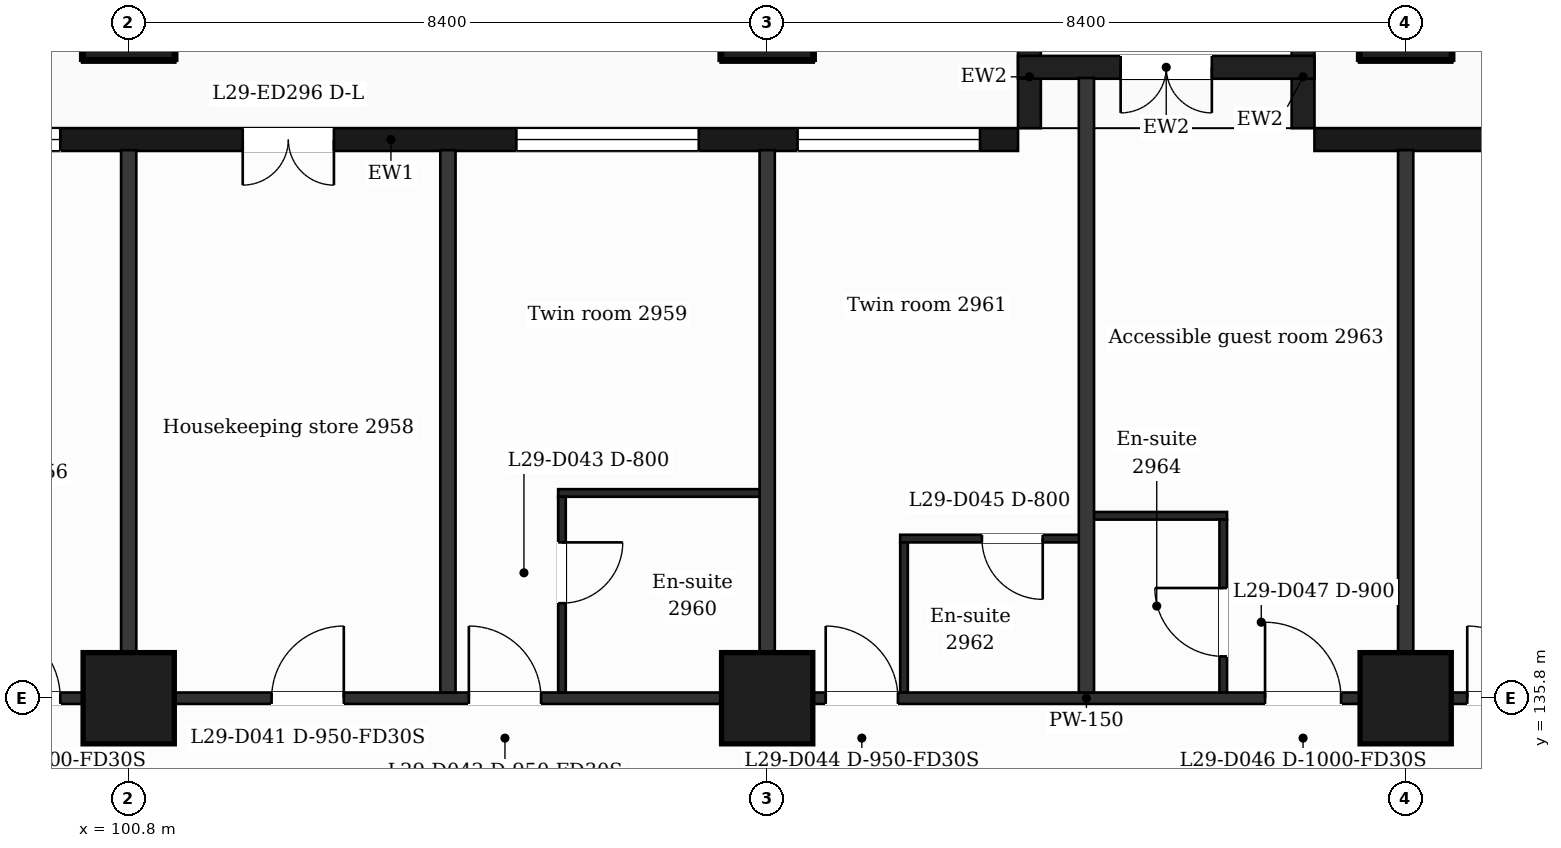
"""IFC4 building model, lengths in metres.
Left out: names, types, materials, properties, quantities, classifications, styles, units other than length and angle.
Written with IfcOpenShell. Run it as: python <this file> out.ifc"""

import sys

from ifc_helpers import new_model, si_unit, direction, frame, frame_2d, origin, origin_2d, place, context, subcontext, project, spatial, rectangle, extrude, element, fill, save


model = new_model("IFC4")
c1 = context("Model", 3, precision=1e-05, world=origin(), true_north=direction((0.0, 1.0)))
c2 = subcontext(c1, "Body", "Model", "MODEL_VIEW")
j1 = project(units=[si_unit("LENGTHUNIT", "METRE"), si_unit("PLANEANGLEUNIT", "RADIAN")], contexts=[c1])
p1 = place(None, origin())
s1 = spatial("IfcSite", under=j1, at=p1, CompositionType="ELEMENT")
p2 = place(p1, origin())
s2 = spatial("IfcBuilding", under=s1, at=p2, CompositionType="ELEMENT")
p3 = place(p2, frame((0.0, 0.0, 124.3)))
s3 = spatial("IfcBuildingStorey", under=s2, at=p3, CompositionType="ELEMENT", Elevation=124.3)
for number, where, z_axis, x_axis in (
    (1, (100.8, 135.8, 0.0), (0.0, 0.0, 1.0), (1.0, 0.0, 0.0)),
    (2, (109.2, 135.8, 0.0), (0.0, 0.0, 1.0), (1.0, 0.0, 0.0)),
    (3, (117.6, 135.8, 0.0), (0.0, 0.0, 1.0), (1.0, 0.0, 0.0)),
    (4, (100.8, 144.8, 0.0), (0.0, 0.0, 1.0), (1.0, 0.0, 0.0)),
    (5, (109.2, 144.8, 0.0), (0.0, 0.0, 1.0), (1.0, 0.0, 0.0)),
    (6, (117.6, 144.8, 0.0), (0.0, 0.0, 1.0), (1.0, 0.0, 0.0)),
):
    element("IfcColumn", number, at=place(p3, frame(where, z_axis=z_axis, x_axis=x_axis)), inside=s3, PredefinedType="COLUMN", context=c2, shape_type="SweptSolid", body=[
        extrude(rectangle(XDim=1.2, YDim=1.2, at=origin_2d()), origin(), (0.0, 0.0, 1.0), 3.7),
    ])
p4 = place(p3, frame((130.65, 143.15, 0.0), z_axis=(0.0, 0.0, 1.0), x_axis=(-1.0, 0.0, 0.0)))
e7 = element("IfcWall", 7, at=p4, inside=s3, PredefinedType="SOLIDWALL", context=c2, shape_type="SweptSolid", body=[
    extrude(rectangle(XDim=14.25, YDim=0.3, at=frame_2d((7.125, 0.0))), origin(), (0.0, 0.0, 1.0), 3.38),
])
p5 = place(p4, frame((1.35, 0.0, 0.9)))
e8 = element("IfcOpeningElement", 8, at=p5, cuts=e7, PredefinedType="OPENING", context=c2, shape_type="SweptSolid", body=[
    extrude(rectangle(XDim=2.4, YDim=2.1, at=frame_2d((1.2, 1.05))), frame((0.0, 0.16, 0.0), z_axis=(0.0, -1.0, 0.0), x_axis=(1.0, 0.0, 0.0)), (0.0, 0.0, 1.0), 0.32),
])
p6 = place(p4, frame((6.15, 0.0, 0.0)))
e9 = element("IfcOpeningElement", 9, at=p6, cuts=e7, PredefinedType="OPENING", context=c2, shape_type="SweptSolid", body=[
    extrude(rectangle(XDim=1.2, YDim=2.4, at=frame_2d((0.6, 1.2))), frame((0.0, 0.16, 0.0), z_axis=(0.0, -1.0, 0.0), x_axis=(1.0, 0.0, 0.0)), (0.0, 0.0, 1.0), 0.32),
])
p7 = place(p4, frame((10.35, 0.0, 0.9)))
e10 = element("IfcOpeningElement", 10, at=p7, cuts=e7, PredefinedType="OPENING", context=c2, shape_type="SweptSolid", body=[
    extrude(rectangle(XDim=1.2, YDim=2.1, at=frame_2d((0.6, 1.05))), frame((0.0, 0.16, 0.0), z_axis=(0.0, -1.0, 0.0), x_axis=(1.0, 0.0, 0.0)), (0.0, 0.0, 1.0), 0.32),
])
p8 = place(p3, frame((112.5, 143.15, 0.0), z_axis=(0.0, 0.0, 1.0), x_axis=(-1.0, 0.0, 0.0)))
e11 = element("IfcWall", 11, at=p8, inside=s3, PredefinedType="SOLIDWALL", context=c2, shape_type="SweptSolid", body=[
    extrude(rectangle(XDim=16.5, YDim=0.3, at=frame_2d((8.25, 0.0))), origin(), (0.0, 0.0, 1.0), 3.38),
])
p9 = place(p8, frame((0.5, 0.0, 0.9)))
e12 = element("IfcOpeningElement", 12, at=p9, cuts=e11, PredefinedType="OPENING", context=c2, shape_type="SweptSolid", body=[
    extrude(rectangle(XDim=2.4, YDim=2.1, at=frame_2d((1.2, 1.05))), frame((0.0, 0.16, 0.0), z_axis=(0.0, -1.0, 0.0), x_axis=(1.0, 0.0, 0.0)), (0.0, 0.0, 1.0), 0.32),
])
p10 = place(p8, frame((4.2, 0.0, 0.9)))
e13 = element("IfcOpeningElement", 13, at=p10, cuts=e11, PredefinedType="OPENING", context=c2, shape_type="SweptSolid", body=[
    extrude(rectangle(XDim=2.4, YDim=2.1, at=frame_2d((1.2, 1.05))), frame((0.0, 0.16, 0.0), z_axis=(0.0, -1.0, 0.0), x_axis=(1.0, 0.0, 0.0)), (0.0, 0.0, 1.0), 0.32),
])
p11 = place(p8, frame((9.0, 0.0, 0.0)))
e14 = element("IfcOpeningElement", 14, at=p11, cuts=e11, PredefinedType="OPENING", context=c2, shape_type="SweptSolid", body=[
    extrude(rectangle(XDim=1.2, YDim=2.4, at=frame_2d((0.6, 1.2))), frame((0.0, 0.16, 0.0), z_axis=(0.0, -1.0, 0.0), x_axis=(1.0, 0.0, 0.0)), (0.0, 0.0, 1.0), 0.32),
])
p12 = place(p8, frame((12.6, 0.0, 0.9)))
e15 = element("IfcOpeningElement", 15, at=p12, cuts=e11, PredefinedType="OPENING", context=c2, shape_type="SweptSolid", body=[
    extrude(rectangle(XDim=2.4, YDim=2.1, at=frame_2d((1.2, 1.05))), frame((0.0, 0.16, 0.0), z_axis=(0.0, -1.0, 0.0), x_axis=(1.0, 0.0, 0.0)), (0.0, 0.0, 1.0), 0.32),
])
for number, where, z_axis, x_axis in (
    (16, (116.25, 143.3, 0.0), (0.0, 0.0, 1.0), (0.0, 1.0, 0.0)),
    (17, (112.65, 143.3, 0.0), (0.0, 0.0, 1.0), (0.0, 1.0, 0.0)),
):
    element("IfcWall", number, at=place(p3, frame(where, z_axis=z_axis, x_axis=x_axis)), inside=s3, PredefinedType="SOLIDWALL", context=c2, shape_type="SweptSolid", body=[
        extrude(rectangle(XDim=1.35, YDim=0.3, at=frame_2d((0.675, 0.0))), origin(), (0.0, 0.0, 1.0), 3.38),
    ])
p13 = place(p3, frame((116.4, 144.1, 0.0), z_axis=(0.0, 0.0, 1.0), x_axis=(-1.0, 0.0, 0.0)))
e18 = element("IfcWall", 18, at=p13, inside=s3, PredefinedType="SOLIDWALL", context=c2, shape_type="SweptSolid", body=[
    extrude(rectangle(XDim=3.9, YDim=0.3, at=frame_2d((1.95, 0.0))), origin(), (0.0, 0.0, 1.0), 3.38),
])
p14 = place(p13, frame((1.35, 0.0, 0.0)))
e19 = element("IfcOpeningElement", 19, at=p14, cuts=e18, PredefinedType="OPENING", context=c2, shape_type="SweptSolid", body=[
    extrude(rectangle(XDim=1.2, YDim=2.4, at=frame_2d((0.6, 1.2))), frame((0.0, 0.16, 0.0), z_axis=(0.0, -1.0, 0.0), x_axis=(1.0, 0.0, 0.0)), (0.0, 0.0, 1.0), 0.32),
])
p15 = place(p3, frame((90.895, 135.8, 0.0), z_axis=(0.0, 0.0, 1.0), x_axis=(1.0, 0.0, 0.0)))
e20 = element("IfcWall", 20, at=p15, inside=s3, PredefinedType="PARTITIONING", context=c2, shape_type="SweptSolid", body=[
    extrude(rectangle(XDim=45.011, YDim=0.15, at=frame_2d((22.505, 0.0))), origin(), (0.0, 0.0, 1.0), 3.38),
])
p16 = place(p15, frame((8.005, 0.0, 0.0)))
e21 = element("IfcOpeningElement", 21, at=p16, cuts=e20, PredefinedType="OPENING", context=c2, shape_type="SweptSolid", body=[
    extrude(rectangle(XDim=1.0, YDim=2.1, at=frame_2d((0.5, 1.05))), frame((0.0, 0.085, 0.0), z_axis=(0.0, -1.0, 0.0), x_axis=(1.0, 0.0, 0.0)), (0.0, 0.0, 1.0), 0.17),
])
p17 = place(p15, frame((11.785, 0.0, 0.0)))
e22 = element("IfcOpeningElement", 22, at=p17, cuts=e20, PredefinedType="OPENING", context=c2, shape_type="SweptSolid", body=[
    extrude(rectangle(XDim=0.95, YDim=2.1, at=frame_2d((0.475, 1.05))), frame((0.0, 0.085, 0.0), z_axis=(0.0, -1.0, 0.0), x_axis=(1.0, 0.0, 0.0)), (0.0, 0.0, 1.0), 0.17),
])
p18 = place(p15, frame((14.38, 0.0, 0.0)))
e23 = element("IfcOpeningElement", 23, at=p18, cuts=e20, PredefinedType="OPENING", context=c2, shape_type="SweptSolid", body=[
    extrude(rectangle(XDim=0.95, YDim=2.1, at=frame_2d((0.475, 1.05))), frame((0.0, 0.085, 0.0), z_axis=(0.0, -1.0, 0.0), x_axis=(1.0, 0.0, 0.0)), (0.0, 0.0, 1.0), 0.17),
])
p19 = place(p15, frame((19.075, 0.0, 0.0)))
e24 = element("IfcOpeningElement", 24, at=p19, cuts=e20, PredefinedType="OPENING", context=c2, shape_type="SweptSolid", body=[
    extrude(rectangle(XDim=0.95, YDim=2.1, at=frame_2d((0.475, 1.05))), frame((0.0, 0.085, 0.0), z_axis=(0.0, -1.0, 0.0), x_axis=(1.0, 0.0, 0.0)), (0.0, 0.0, 1.0), 0.17),
])
p20 = place(p15, frame((24.855, 0.0, 0.0)))
e25 = element("IfcOpeningElement", 25, at=p20, cuts=e20, PredefinedType="OPENING", context=c2, shape_type="SweptSolid", body=[
    extrude(rectangle(XDim=1.0, YDim=2.1, at=frame_2d((0.5, 1.05))), frame((0.0, 0.085, 0.0), z_axis=(0.0, -1.0, 0.0), x_axis=(1.0, 0.0, 0.0)), (0.0, 0.0, 1.0), 0.17),
])
p21 = place(p15, frame((27.515, 0.0, 0.0)))
e26 = element("IfcOpeningElement", 26, at=p21, cuts=e20, PredefinedType="OPENING", context=c2, shape_type="SweptSolid", body=[
    extrude(rectangle(XDim=0.95, YDim=2.1, at=frame_2d((0.475, 1.05))), frame((0.0, 0.085, 0.0), z_axis=(0.0, -1.0, 0.0), x_axis=(1.0, 0.0, 0.0)), (0.0, 0.0, 1.0), 0.17),
])
p22 = place(p15, frame((33.242, 0.0, 0.0)))
e27 = element("IfcOpeningElement", 27, at=p22, cuts=e20, PredefinedType="OPENING", context=c2, shape_type="SweptSolid", body=[
    extrude(rectangle(XDim=0.95, YDim=2.1, at=frame_2d((0.475, 1.05))), frame((0.0, 0.085, 0.0), z_axis=(0.0, -1.0, 0.0), x_axis=(1.0, 0.0, 0.0)), (0.0, 0.0, 1.0), 0.17),
])
p23 = place(p15, frame((37.105, 0.0, 0.0)))
e28 = element("IfcOpeningElement", 28, at=p23, cuts=e20, PredefinedType="OPENING", context=c2, shape_type="SweptSolid", body=[
    extrude(rectangle(XDim=1.0, YDim=2.1, at=frame_2d((0.5, 1.05))), frame((0.0, 0.085, 0.0), z_axis=(0.0, -1.0, 0.0), x_axis=(1.0, 0.0, 0.0)), (0.0, 0.0, 1.0), 0.17),
])
p24 = place(p3, frame((110.95, 137.9, 0.0), z_axis=(0.0, 0.0, 1.0), x_axis=(1.0, 0.0, 0.0)))
e29 = element("IfcWall", 29, at=p24, inside=s3, PredefinedType="PARTITIONING", context=c2, shape_type="SweptSolid", body=[
    extrude(rectangle(XDim=2.45, YDim=0.1, at=frame_2d((1.225, 0.0))), origin(), (0.0, 0.0, 1.0), 3.38),
])
p25 = place(p24, frame((1.075, 0.0, 0.0)))
e30 = element("IfcOpeningElement", 30, at=p25, cuts=e29, PredefinedType="OPENING", context=c2, shape_type="SweptSolid", body=[
    extrude(rectangle(XDim=0.8, YDim=2.1, at=frame_2d((0.4, 1.05))), frame((0.0, 0.06, 0.0), z_axis=(0.0, -1.0, 0.0), x_axis=(1.0, 0.0, 0.0)), (0.0, 0.0, 1.0), 0.12),
])
p26 = place(p3, frame((113.4, 138.2, 0.0), z_axis=(0.0, 0.0, 1.0), x_axis=(1.0, 0.0, 0.0)))
e31 = element("IfcWall", 31, at=p26, inside=s3, PredefinedType="PARTITIONING", context=c2, shape_type="SweptSolid", body=[
    extrude(rectangle(XDim=1.85, YDim=0.1, at=frame_2d((0.925, 0.0))), origin(), (0.0, 0.0, 1.0), 3.38),
])
p27 = place(p3, frame((106.45, 138.5, 0.0), z_axis=(0.0, 0.0, 1.0), x_axis=(1.0, 0.0, 0.0)))
e32 = element("IfcWall", 32, at=p27, inside=s3, PredefinedType="PARTITIONING", context=c2, shape_type="SweptSolid", body=[
    extrude(rectangle(XDim=2.75, YDim=0.1, at=frame_2d((1.375, 0.0))), origin(), (0.0, 0.0, 1.0), 3.38),
])
for number, where, z_axis, x_axis in (
    (33, (100.8, 135.875, 0.0), (0.0, 0.0, 1.0), (0.0, 1.0, 0.0)),
    (34, (105.0, 135.875, 0.0), (0.0, 0.0, 1.0), (0.0, 1.0, 0.0)),
):
    element("IfcWall", number, at=place(p3, frame(where, z_axis=z_axis, x_axis=x_axis)), inside=s3, PredefinedType="PARTITIONING", context=c2, shape_type="SweptSolid", body=[
        extrude(rectangle(XDim=7.135, YDim=0.2, at=frame_2d((3.567, 0.0))), origin(), (0.0, 0.0, 1.0), 3.38),
    ])
p28 = place(p3, frame((106.5, 135.875, 0.0), z_axis=(0.0, 0.0, 1.0), x_axis=(0.0, 1.0, 0.0)))
e35 = element("IfcWall", 35, at=p28, inside=s3, PredefinedType="PARTITIONING", context=c2, shape_type="SweptSolid", body=[
    extrude(rectangle(XDim=2.575, YDim=0.1, at=frame_2d((1.288, 0.0))), origin(), (0.0, 0.0, 1.0), 3.38),
])
p29 = place(p28, frame((1.175, 0.0, 0.0)))
e36 = element("IfcOpeningElement", 36, at=p29, cuts=e35, PredefinedType="OPENING", context=c2, shape_type="SweptSolid", body=[
    extrude(rectangle(XDim=0.8, YDim=2.1, at=frame_2d((0.4, 1.05))), frame((0.0, 0.06, 0.0), z_axis=(0.0, -1.0, 0.0), x_axis=(1.0, 0.0, 0.0)), (0.0, 0.0, 1.0), 0.12),
])
p30 = place(p3, frame((109.2, 135.875, 0.0), z_axis=(0.0, 0.0, 1.0), x_axis=(0.0, 1.0, 0.0)))
e37 = element("IfcWall", 37, at=p30, inside=s3, PredefinedType="PARTITIONING", context=c2, shape_type="SweptSolid", body=[
    extrude(rectangle(XDim=7.135, YDim=0.2, at=frame_2d((3.567, 0.0))), origin(), (0.0, 0.0, 1.0), 3.38),
])
p31 = place(p3, frame((111.0, 135.875, 0.0), z_axis=(0.0, 0.0, 1.0), x_axis=(0.0, 1.0, 0.0)))
e38 = element("IfcWall", 38, at=p31, inside=s3, PredefinedType="PARTITIONING", context=c2, shape_type="SweptSolid", body=[
    extrude(rectangle(XDim=1.975, YDim=0.1, at=frame_2d((0.988, 0.0))), origin(), (0.0, 0.0, 1.0), 3.38),
])
p32 = place(p3, frame((113.4, 135.875, 0.0), z_axis=(0.0, 0.0, 1.0), x_axis=(0.0, 1.0, 0.0)))
e39 = element("IfcWall", 39, at=p32, inside=s3, PredefinedType="PARTITIONING", context=c2, shape_type="SweptSolid", body=[
    extrude(rectangle(XDim=8.085, YDim=0.2, at=frame_2d((4.042, 0.0))), origin(), (0.0, 0.0, 1.0), 3.38),
])
p33 = place(p3, frame((115.2, 135.875, 0.0), z_axis=(0.0, 0.0, 1.0), x_axis=(0.0, 1.0, 0.0)))
e40 = element("IfcWall", 40, at=p33, inside=s3, PredefinedType="PARTITIONING", context=c2, shape_type="SweptSolid", body=[
    extrude(rectangle(XDim=2.275, YDim=0.1, at=frame_2d((1.137, 0.0))), origin(), (0.0, 0.0, 1.0), 3.38),
])
p34 = place(p33, frame((0.475, 0.0, 0.0)))
e41 = element("IfcOpeningElement", 41, at=p34, cuts=e40, PredefinedType="OPENING", context=c2, shape_type="SweptSolid", body=[
    extrude(rectangle(XDim=0.9, YDim=2.1, at=frame_2d((0.45, 1.05))), frame((0.0, 0.06, 0.0), z_axis=(0.0, -1.0, 0.0), x_axis=(1.0, 0.0, 0.0)), (0.0, 0.0, 1.0), 0.12),
])
p35 = place(p3, frame((117.6, 135.875, 0.0), z_axis=(0.0, 0.0, 1.0), x_axis=(0.0, 1.0, 0.0)))
e42 = element("IfcWall", 42, at=p35, inside=s3, PredefinedType="PARTITIONING", context=c2, shape_type="SweptSolid", body=[
    extrude(rectangle(XDim=7.135, YDim=0.2, at=frame_2d((3.567, 0.0))), origin(), (0.0, 0.0, 1.0), 3.38),
])
p36 = place(p9, origin())
e43 = element("IfcWindow", 43, at=p36, inside=s3, PartitioningType="SINGLE_PANEL", PredefinedType="WINDOW", context=c2, shape_type="SweptSolid", body=[
    extrude(rectangle(XDim=2.4, YDim=2.1, at=frame_2d((1.2, 1.05))), frame((0.0, 0.03, 0.0), z_axis=(0.0, -1.0, 0.0), x_axis=(1.0, 0.0, 0.0)), (0.0, 0.0, 1.0), 0.06),
])
fill(e12, e43)
p37 = place(p10, origin())
e44 = element("IfcWindow", 44, at=p37, inside=s3, PartitioningType="SINGLE_PANEL", PredefinedType="WINDOW", context=c2, shape_type="SweptSolid", body=[
    extrude(rectangle(XDim=2.4, YDim=2.1, at=frame_2d((1.2, 1.05))), frame((0.0, 0.03, 0.0), z_axis=(0.0, -1.0, 0.0), x_axis=(1.0, 0.0, 0.0)), (0.0, 0.0, 1.0), 0.06),
])
fill(e13, e44)
p38 = place(p11, origin())
e45 = element("IfcDoor", 45, at=p38, inside=s3, OperationType="DOUBLE_DOOR_SINGLE_SWING", PredefinedType="DOOR", context=c2, shape_type="SweptSolid", body=[
    extrude(rectangle(XDim=1.2, YDim=2.4, at=frame_2d((0.6, 1.2))), frame((0.0, 0.025, 0.0), z_axis=(0.0, -1.0, 0.0), x_axis=(1.0, 0.0, 0.0)), (0.0, 0.0, 1.0), 0.05),
])
fill(e14, e45)
p39 = place(p12, origin())
e46 = element("IfcWindow", 46, at=p39, inside=s3, PartitioningType="SINGLE_PANEL", PredefinedType="WINDOW", context=c2, shape_type="SweptSolid", body=[
    extrude(rectangle(XDim=2.4, YDim=2.1, at=frame_2d((1.2, 1.05))), frame((0.0, 0.03, 0.0), z_axis=(0.0, -1.0, 0.0), x_axis=(1.0, 0.0, 0.0)), (0.0, 0.0, 1.0), 0.06),
])
fill(e15, e46)
p40 = place(p14, origin())
e47 = element("IfcDoor", 47, at=p40, inside=s3, OperationType="DOUBLE_DOOR_SINGLE_SWING", PredefinedType="DOOR", context=c2, shape_type="SweptSolid", body=[
    extrude(rectangle(XDim=1.2, YDim=2.4, at=frame_2d((0.6, 1.2))), frame((0.0, 0.025, 0.0), z_axis=(0.0, -1.0, 0.0), x_axis=(1.0, 0.0, 0.0)), (0.0, 0.0, 1.0), 0.05),
])
fill(e19, e47)
p41 = place(p16, origin())
e48 = element("IfcDoor", 48, at=p41, inside=s3, OperationType="SINGLE_SWING_LEFT", PredefinedType="DOOR", context=c2, shape_type="SweptSolid", body=[
    extrude(rectangle(XDim=1.0, YDim=2.1, at=frame_2d((0.5, 1.05))), frame((0.0, 0.025, 0.0), z_axis=(0.0, -1.0, 0.0), x_axis=(1.0, 0.0, 0.0)), (0.0, 0.0, 1.0), 0.05),
])
fill(e21, e48)
p42 = place(p17, origin())
e49 = element("IfcDoor", 49, at=p42, inside=s3, OperationType="SINGLE_SWING_RIGHT", PredefinedType="DOOR", context=c2, shape_type="SweptSolid", body=[
    extrude(rectangle(XDim=0.95, YDim=2.1, at=frame_2d((0.475, 1.05))), frame((0.0, 0.025, 0.0), z_axis=(0.0, -1.0, 0.0), x_axis=(1.0, 0.0, 0.0)), (0.0, 0.0, 1.0), 0.05),
])
fill(e22, e49)
p43 = place(p18, origin())
e50 = element("IfcDoor", 50, at=p43, inside=s3, OperationType="SINGLE_SWING_LEFT", PredefinedType="DOOR", context=c2, shape_type="SweptSolid", body=[
    extrude(rectangle(XDim=0.95, YDim=2.1, at=frame_2d((0.475, 1.05))), frame((0.0, 0.025, 0.0), z_axis=(0.0, -1.0, 0.0), x_axis=(1.0, 0.0, 0.0)), (0.0, 0.0, 1.0), 0.05),
])
fill(e23, e50)
p44 = place(p29, origin())
e51 = element("IfcDoor", 51, at=p44, inside=s3, OperationType="SINGLE_SWING_RIGHT", PredefinedType="DOOR", context=c2, shape_type="SweptSolid", body=[
    extrude(rectangle(XDim=0.8, YDim=2.1, at=frame_2d((0.4, 1.05))), frame((0.0, 0.025, 0.0), z_axis=(0.0, -1.0, 0.0), x_axis=(1.0, 0.0, 0.0)), (0.0, 0.0, 1.0), 0.05),
])
fill(e36, e51)
p45 = place(p19, origin())
e52 = element("IfcDoor", 52, at=p45, inside=s3, OperationType="SINGLE_SWING_LEFT", PredefinedType="DOOR", context=c2, shape_type="SweptSolid", body=[
    extrude(rectangle(XDim=0.95, YDim=2.1, at=frame_2d((0.475, 1.05))), frame((0.0, 0.025, 0.0), z_axis=(0.0, -1.0, 0.0), x_axis=(1.0, 0.0, 0.0)), (0.0, 0.0, 1.0), 0.05),
])
fill(e24, e52)
p46 = place(p25, origin())
e53 = element("IfcDoor", 53, at=p46, inside=s3, OperationType="SINGLE_SWING_RIGHT", PredefinedType="DOOR", context=c2, shape_type="SweptSolid", body=[
    extrude(rectangle(XDim=0.8, YDim=2.1, at=frame_2d((0.4, 1.05))), frame((0.0, 0.025, 0.0), z_axis=(0.0, -1.0, 0.0), x_axis=(1.0, 0.0, 0.0)), (0.0, 0.0, 1.0), 0.05),
])
fill(e30, e53)
p47 = place(p20, origin())
e54 = element("IfcDoor", 54, at=p47, inside=s3, OperationType="SINGLE_SWING_LEFT", PredefinedType="DOOR", context=c2, shape_type="SweptSolid", body=[
    extrude(rectangle(XDim=1.0, YDim=2.1, at=frame_2d((0.5, 1.05))), frame((0.0, 0.025, 0.0), z_axis=(0.0, -1.0, 0.0), x_axis=(1.0, 0.0, 0.0)), (0.0, 0.0, 1.0), 0.05),
])
fill(e25, e54)
p48 = place(p34, origin())
e55 = element("IfcDoor", 55, at=p48, inside=s3, OperationType="SINGLE_SWING_RIGHT", PredefinedType="DOOR", context=c2, shape_type="SweptSolid", body=[
    extrude(rectangle(XDim=0.9, YDim=2.1, at=frame_2d((0.45, 1.05))), frame((0.0, 0.025, 0.0), z_axis=(0.0, -1.0, 0.0), x_axis=(1.0, 0.0, 0.0)), (0.0, 0.0, 1.0), 0.05),
])
fill(e41, e55)
p49 = place(p21, origin())
e56 = element("IfcDoor", 56, at=p49, inside=s3, OperationType="SINGLE_SWING_LEFT", PredefinedType="DOOR", context=c2, shape_type="SweptSolid", body=[
    extrude(rectangle(XDim=0.95, YDim=2.1, at=frame_2d((0.475, 1.05))), frame((0.0, 0.025, 0.0), z_axis=(0.0, -1.0, 0.0), x_axis=(1.0, 0.0, 0.0)), (0.0, 0.0, 1.0), 0.05),
])
fill(e26, e56)
save(model, sys.argv[1])
